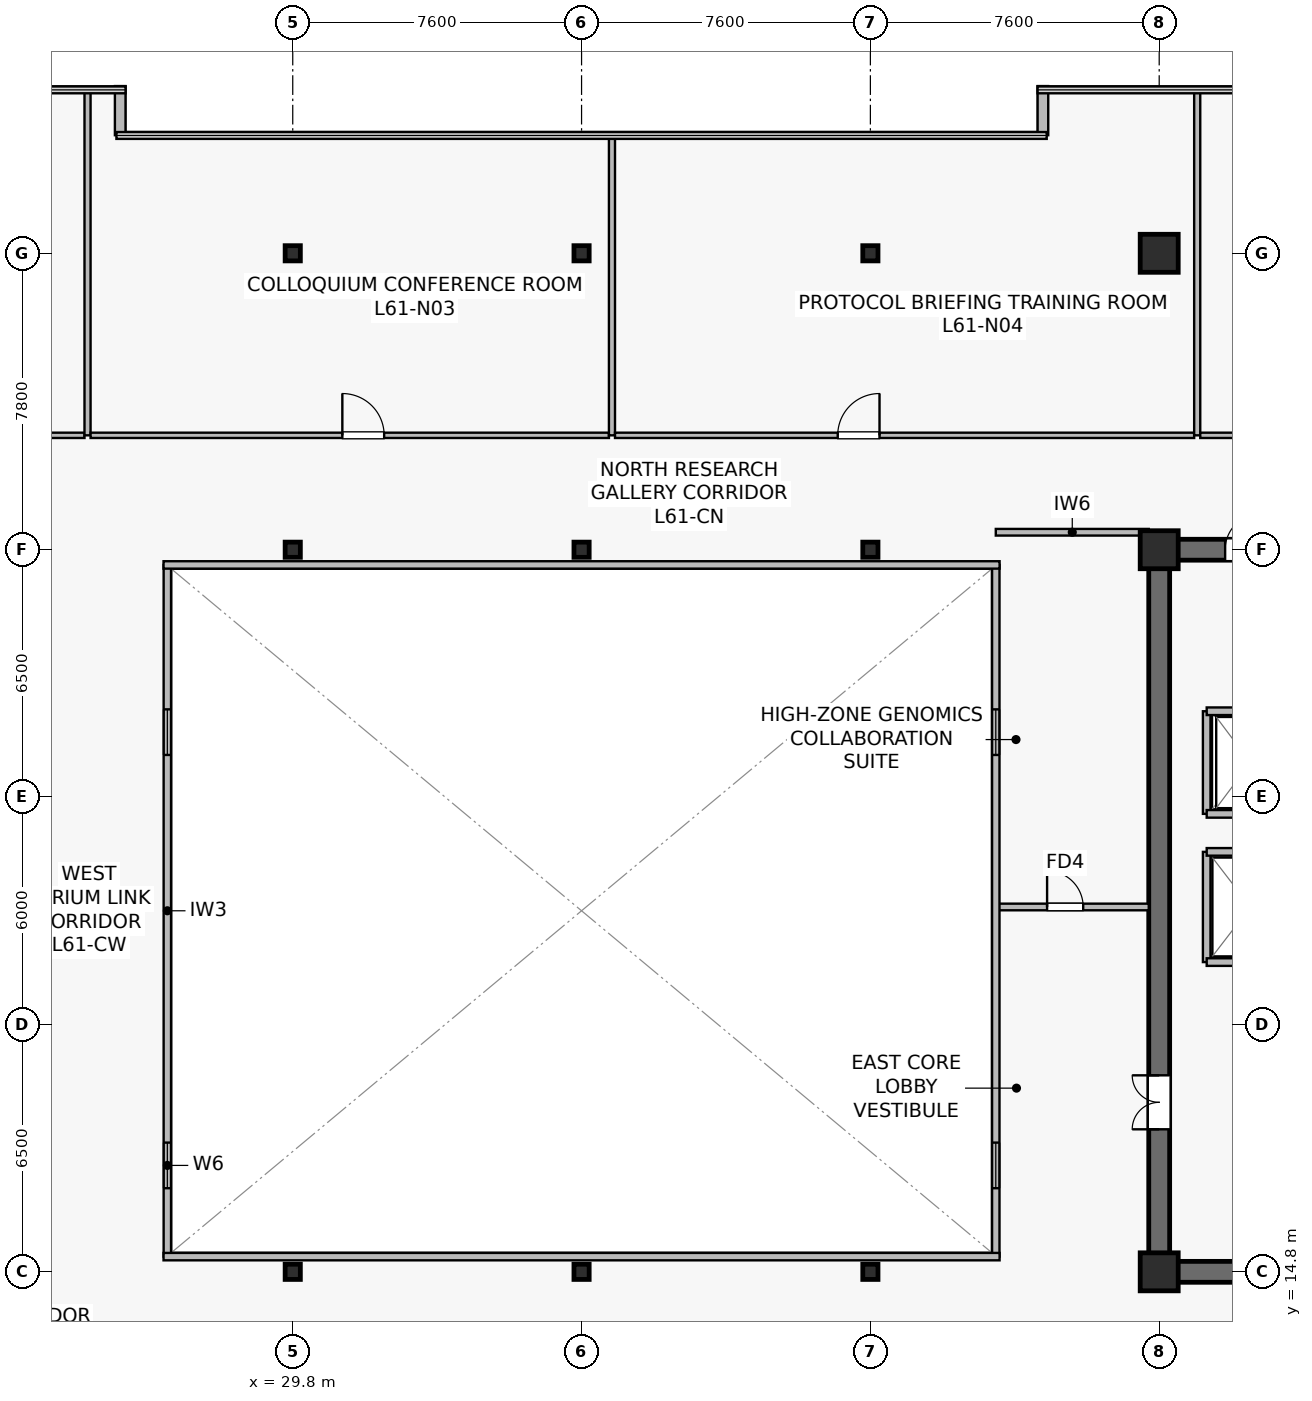
"""IFC4 building model, lengths in metres.
Left out: names, types, materials, properties, quantities, classifications, styles, units other than length and angle.
Written with IfcOpenShell. Run it as: python <this file> out.ifc"""

import sys

from ifc_helpers import new_model, si_unit, direction, frame, frame_2d, origin, origin_2d, place, context, subcontext, project, spatial, rectangle, hollow_rectangle, extrude, source, transform, mapped, element, fill, save


model = new_model("IFC4")
c1 = context("Model", 3, precision=1e-05, world=origin(), true_north=direction((0.0, 1.0)))
c2 = subcontext(c1, "Body", "Model", "MODEL_VIEW")
j1 = project(units=[si_unit("LENGTHUNIT", "METRE"), si_unit("PLANEANGLEUNIT", "RADIAN")], contexts=[c1])
p1 = place(None, origin())
s1 = spatial("IfcSite", under=j1, at=p1, CompositionType="ELEMENT")
p2 = place(p1, origin())
s2 = spatial("IfcBuilding", under=s1, at=p2, CompositionType="ELEMENT")
p3 = place(p2, frame((0.0, 0.0, 254.7)))
s3 = spatial("IfcBuildingStorey", under=s2, at=p3, CompositionType="ELEMENT", Elevation=254.7)
p4 = place(p3, frame((52.325, 14.8, 0.0), z_axis=(0.0, 0.0, 1.0), x_axis=(1.0, 0.0, 0.0)))
e1 = element("IfcWall", 1, at=p4, inside=s3, PredefinedType="SHEAR", context=c2, shape_type="SweptSolid", body=[
    extrude(rectangle(XDim=15.35, YDim=0.55, at=frame_2d((7.675, 0.0))), origin(), (0.0, 0.0, 1.0), 3.8),
])
p5 = place(p3, frame((52.325, 33.8, 0.0), z_axis=(0.0, 0.0, 1.0), x_axis=(1.0, 0.0, 0.0)))
e2 = element("IfcWall", 2, at=p5, inside=s3, PredefinedType="SHEAR", context=c2, shape_type="SweptSolid", body=[
    extrude(rectangle(XDim=15.35, YDim=0.55, at=frame_2d((7.675, 0.0))), origin(), (0.0, 0.0, 1.0), 3.8),
])
p6 = place(p5, frame((8.775, 0.0, 0.0)))
e3 = element("IfcOpeningElement", 3, at=p6, cuts=e2, PredefinedType="OPENING", context=c2, shape_type="SweptSolid", body=[
    extrude(rectangle(XDim=0.95, YDim=2.15, at=frame_2d((0.475, 1.075))), frame((0.0, 0.285, 0.0), z_axis=(0.0, -1.0, 0.0), x_axis=(1.0, 0.0, 0.0)), (0.0, 0.0, 1.0), 0.57),
])
p7 = place(p5, frame((5.41, 0.0, 0.0)))
e4 = element("IfcOpeningElement", 4, at=p7, cuts=e2, PredefinedType="OPENING", context=c2, shape_type="SweptSolid", body=[
    extrude(rectangle(XDim=0.95, YDim=2.15, at=frame_2d((0.475, 1.075))), frame((0.0, 0.285, 0.0), z_axis=(0.0, -1.0, 0.0), x_axis=(1.0, 0.0, 0.0)), (0.0, 0.0, 1.0), 0.57),
])
p8 = place(p5, frame((2.01, 0.0, 0.0)))
e5 = element("IfcOpeningElement", 5, at=p8, cuts=e2, PredefinedType="OPENING", context=c2, shape_type="SweptSolid", body=[
    extrude(rectangle(XDim=0.95, YDim=2.15, at=frame_2d((0.475, 1.075))), frame((0.0, 0.285, 0.0), z_axis=(0.0, -1.0, 0.0), x_axis=(1.0, 0.0, 0.0)), (0.0, 0.0, 1.0), 0.57),
])
p9 = place(p3, frame((52.6, 15.075, 0.0), z_axis=(0.0, 0.0, 1.0), x_axis=(0.0, 1.0, 0.0)))
e6 = element("IfcWall", 6, at=p9, inside=s3, PredefinedType="SHEAR", context=c2, shape_type="SweptSolid", body=[
    extrude(rectangle(XDim=18.45, YDim=0.55, at=frame_2d((9.225, 0.0))), origin(), (0.0, 0.0, 1.0), 3.8),
])
p10 = place(p9, frame((3.475, 0.0, 0.0)))
e7 = element("IfcOpeningElement", 7, at=p10, cuts=e6, PredefinedType="OPENING", context=c2, shape_type="SweptSolid", body=[
    extrude(rectangle(XDim=1.42, YDim=2.2, at=frame_2d((0.71, 1.1))), frame((0.0, 0.285, 0.0), z_axis=(0.0, -1.0, 0.0), x_axis=(1.0, 0.0, 0.0)), (0.0, 0.0, 1.0), 0.57),
])
m1 = source(origin(), c2, "Body", "SweptSolid", [
    extrude(rectangle(XDim=1.0, YDim=1.0, at=origin_2d()), origin(), (0.0, 0.0, 1.0), 4.1),
])
for number, where, z_axis, x_axis in (
    (8, (52.6, 14.8, 0.0), (0.0, 0.0, 1.0), (1.0, 0.0, 0.0)),
    (9, (52.6, 33.8, 0.0), (0.0, 0.0, 1.0), (1.0, 0.0, 0.0)),
    (10, (52.6, 41.6, 0.0), (0.0, 0.0, 1.0), (1.0, 0.0, 0.0)),
):
    element("IfcColumn", number, at=place(p3, frame(where, z_axis=z_axis, x_axis=x_axis)), inside=s3, PredefinedType="COLUMN", context=c2, shape_type="MappedRepresentation", body=[
        mapped(m1, transform((0.0, 0.0, 0.0), scale=1.0)),
    ])
m2 = source(origin(), c2, "Body", "SweptSolid", [
    extrude(hollow_rectangle(XDim=0.4, YDim=0.4, WallThickness=0.019, at=origin_2d()), origin(), (0.0, 0.0, 1.0), 4.1),
])
for number, where, z_axis, x_axis in (
    (11, (29.8, 14.8, 0.0), (0.0, 0.0, 1.0), (1.0, 0.0, 0.0)),
    (12, (29.8, 33.8, 0.0), (0.0, 0.0, 1.0), (1.0, 0.0, 0.0)),
    (13, (29.8, 41.6, 0.0), (0.0, 0.0, 1.0), (1.0, 0.0, 0.0)),
    (14, (37.4, 14.8, 0.0), (0.0, 0.0, 1.0), (1.0, 0.0, 0.0)),
    (15, (37.4, 33.8, 0.0), (0.0, 0.0, 1.0), (1.0, 0.0, 0.0)),
    (16, (37.4, 41.6, 0.0), (0.0, 0.0, 1.0), (1.0, 0.0, 0.0)),
    (17, (45.0, 14.8, 0.0), (0.0, 0.0, 1.0), (1.0, 0.0, 0.0)),
    (18, (45.0, 33.8, 0.0), (0.0, 0.0, 1.0), (1.0, 0.0, 0.0)),
    (19, (45.0, 41.6, 0.0), (0.0, 0.0, 1.0), (1.0, 0.0, 0.0)),
):
    element("IfcColumn", number, at=place(p3, frame(where, z_axis=z_axis, x_axis=x_axis)), inside=s3, PredefinedType="COLUMN", context=c2, shape_type="MappedRepresentation", body=[
        mapped(m2, transform((0.0, 0.0, 0.0), scale=1.0)),
    ])
for number, where, z_axis, x_axis in (
    (20, (49.54, 46.0, 0.0), (0.0, 0.0, 1.0), (0.0, -1.0, 0.0)),
    (21, (25.26, 44.707, 0.0), (0.0, 0.0, 1.0), (0.0, 1.0, 0.0)),
):
    element("IfcWall", number, at=place(p3, frame(where, z_axis=z_axis, x_axis=x_axis)), inside=s3, PredefinedType="STANDARD", context=c2, shape_type="SweptSolid", body=[
        extrude(rectangle(XDim=1.293, YDim=0.28, at=frame_2d((0.646, 0.0))), origin(), (0.0, 0.0, 1.0), 3.8),
    ])
p11 = place(p3, frame((53.85, 26.85, 0.0), z_axis=(0.0, 0.0, 1.0), x_axis=(0.0, 1.0, 0.0)))
e22 = element("IfcWall", 22, at=p11, inside=s3, PredefinedType="SOLIDWALL", context=c2, shape_type="SweptSolid", body=[
    extrude(rectangle(XDim=2.7, YDim=0.2, at=frame_2d((1.35, 0.0))), origin(), (0.0, 0.0, 1.0), 3.8),
])
p12 = place(p3, frame((53.85, 29.55, 0.0), z_axis=(0.0, 0.0, 1.0), x_axis=(1.0, 0.0, 0.0)))
e23 = element("IfcWall", 23, at=p12, inside=s3, PredefinedType="SOLIDWALL", context=c2, shape_type="SweptSolid", body=[
    extrude(rectangle(XDim=2.19, YDim=0.2, at=frame_2d((1.095, 0.0))), origin(), (0.0, 0.0, 1.0), 3.8),
])
p13 = place(p3, frame((53.85, 26.85, 0.0), z_axis=(0.0, 0.0, 1.0), x_axis=(1.0, 0.0, 0.0)))
e24 = element("IfcWall", 24, at=p13, inside=s3, PredefinedType="SOLIDWALL", context=c2, shape_type="SweptSolid", body=[
    extrude(rectangle(XDim=2.19, YDim=0.2, at=frame_2d((1.095, 0.0))), origin(), (0.0, 0.0, 1.0), 3.197),
])
p14 = place(p3, frame((53.85, 22.95, 0.0), z_axis=(0.0, 0.0, 1.0), x_axis=(0.0, 1.0, 0.0)))
e25 = element("IfcWall", 25, at=p14, inside=s3, PredefinedType="SOLIDWALL", context=c2, shape_type="SweptSolid", body=[
    extrude(rectangle(XDim=2.9, YDim=0.2, at=frame_2d((1.45, 0.0))), origin(), (0.0, 0.0, 1.0), 2.935),
])
for number, where, z_axis, x_axis in (
    (26, (53.85, 25.85, 0.0), (0.0, 0.0, 1.0), (1.0, 0.0, 0.0)),
    (27, (53.85, 22.95, 0.0), (0.0, 0.0, 1.0), (1.0, 0.0, 0.0)),
):
    element("IfcWall", number, at=place(p3, frame(where, z_axis=z_axis, x_axis=x_axis)), inside=s3, PredefinedType="SOLIDWALL", context=c2, shape_type="SweptSolid", body=[
        extrude(rectangle(XDim=2.19, YDim=0.2, at=frame_2d((1.095, 0.0))), origin(), (0.0, 0.0, 1.0), 3.8),
    ])
p15 = place(p3, frame((48.3, 34.26, 0.0), z_axis=(0.0, 0.0, 1.0), x_axis=(1.0, 0.0, 0.0)))
e28 = element("IfcWall", 28, at=p15, inside=s3, PredefinedType="PARTITIONING", context=c2, shape_type="SweptSolid", body=[
    extrude(rectangle(XDim=4.025, YDim=0.175, at=frame_2d((2.012, 0.0))), origin(), (0.0, 0.0, 1.0), 3.535),
])
p16 = place(p3, frame((48.3, 24.4, 0.0), z_axis=(0.0, 0.0, 1.0), x_axis=(1.0, 0.0, 0.0)))
e29 = element("IfcWall", 29, at=p16, inside=s3, PredefinedType="PARTITIONING", context=c2, shape_type="SweptSolid", body=[
    extrude(rectangle(XDim=4.025, YDim=0.175, at=frame_2d((2.012, 0.0))), origin(), (0.0, 0.0, 1.0), 3.8),
])
p17 = place(p16, frame((1.35, 0.0, 0.0)))
e30 = element("IfcOpeningElement", 30, at=p17, cuts=e29, PredefinedType="OPENING", context=c2, shape_type="SweptSolid", body=[
    extrude(rectangle(XDim=0.95, YDim=2.15, at=frame_2d((0.475, 1.075))), frame((0.0, 0.098, 0.0), z_axis=(0.0, -1.0, 0.0), x_axis=(1.0, 0.0, 0.0)), (0.0, 0.0, 1.0), 0.195),
])
p18 = place(p3, frame((26.5, 15.2, 0.0), z_axis=(0.0, 0.0, 1.0), x_axis=(0.0, 1.0, 0.0)))
e31 = element("IfcWall", 31, at=p18, inside=s3, PredefinedType="SOLIDWALL", context=c2, shape_type="SweptSolid", body=[
    extrude(rectangle(XDim=18.2, YDim=0.195, at=frame_2d((9.1, 0.0))), origin(), (0.0, 0.0, 1.0), 3.8),
])
p19 = place(p18, frame((1.8, 0.0, 0.9)))
e32 = element("IfcOpeningElement", 32, at=p19, cuts=e31, PredefinedType="OPENING", context=c2, shape_type="SweptSolid", body=[
    extrude(rectangle(XDim=1.2, YDim=1.35, at=frame_2d((0.6, 0.675))), frame((0.0, 0.107, 0.0), z_axis=(0.0, -1.0, 0.0), x_axis=(1.0, 0.0, 0.0)), (0.0, 0.0, 1.0), 0.215),
])
p20 = place(p18, frame((13.2, 0.0, 0.9)))
e33 = element("IfcOpeningElement", 33, at=p20, cuts=e31, PredefinedType="OPENING", context=c2, shape_type="SweptSolid", body=[
    extrude(rectangle(XDim=1.2, YDim=1.35, at=frame_2d((0.6, 0.675))), frame((0.0, 0.107, 0.0), z_axis=(0.0, -1.0, 0.0), x_axis=(1.0, 0.0, 0.0)), (0.0, 0.0, 1.0), 0.215),
])
p21 = place(p3, frame((48.3, 15.2, 0.0), z_axis=(0.0, 0.0, 1.0), x_axis=(0.0, 1.0, 0.0)))
e34 = element("IfcWall", 34, at=p21, inside=s3, PredefinedType="SOLIDWALL", context=c2, shape_type="SweptSolid", body=[
    extrude(rectangle(XDim=18.2, YDim=0.195, at=frame_2d((9.1, 0.0))), origin(), (0.0, 0.0, 1.0), 3.8),
])
p22 = place(p21, frame((1.8, 0.0, 0.9)))
e35 = element("IfcOpeningElement", 35, at=p22, cuts=e34, PredefinedType="OPENING", context=c2, shape_type="SweptSolid", body=[
    extrude(rectangle(XDim=1.2, YDim=1.35, at=frame_2d((0.6, 0.675))), frame((0.0, 0.107, 0.0), z_axis=(0.0, -1.0, 0.0), x_axis=(1.0, 0.0, 0.0)), (0.0, 0.0, 1.0), 0.215),
])
p23 = place(p21, frame((13.2, 0.0, 0.9)))
e36 = element("IfcOpeningElement", 36, at=p23, cuts=e34, PredefinedType="OPENING", context=c2, shape_type="SweptSolid", body=[
    extrude(rectangle(XDim=1.2, YDim=1.35, at=frame_2d((0.6, 0.675))), frame((0.0, 0.107, 0.0), z_axis=(0.0, -1.0, 0.0), x_axis=(1.0, 0.0, 0.0)), (0.0, 0.0, 1.0), 0.215),
])
for number, where, z_axis, x_axis in (
    (37, (26.4, 15.2, 0.0), (0.0, 0.0, 1.0), (1.0, 0.0, 0.0)),
    (38, (26.4, 33.4, 0.0), (0.0, 0.0, 1.0), (1.0, 0.0, 0.0)),
):
    element("IfcWall", number, at=place(p3, frame(where, z_axis=z_axis, x_axis=x_axis)), inside=s3, PredefinedType="SOLIDWALL", context=c2, shape_type="SweptSolid", body=[
        extrude(rectangle(XDim=22.0, YDim=0.195, at=frame_2d((11.0, 0.0))), origin(), (0.0, 0.0, 1.0), 3.8),
    ])
p24 = place(p3, frame((13.28, 36.81, 0.0), z_axis=(0.0, 0.0, 1.0), x_axis=(1.0, 0.0, 0.0)))
e39 = element("IfcWall", 39, at=p24, inside=s3, PredefinedType="PARTITIONING", context=c2, shape_type="SweptSolid", body=[
    extrude(rectangle(XDim=11.04, YDim=0.14, at=frame_2d((5.52, 0.0))), origin(), (0.0, 0.0, 1.0), 3.197),
])
p25 = place(p24, frame((4.138, 0.0, 0.0)))
e40 = element("IfcOpeningElement", 40, at=p25, cuts=e39, PredefinedType="OPENING", context=c2, shape_type="SweptSolid", body=[
    extrude(rectangle(XDim=1.1, YDim=2.18, at=frame_2d((0.55, 1.09))), frame((0.0, 0.08, 0.0), z_axis=(0.0, -1.0, 0.0), x_axis=(1.0, 0.0, 0.0)), (0.0, 0.0, 1.0), 0.16),
])
p26 = place(p3, frame((24.4, 36.81, 0.0), z_axis=(0.0, 0.0, 1.0), x_axis=(0.0, 1.0, 0.0)))
e41 = element("IfcWall", 41, at=p26, inside=s3, PredefinedType="PARTITIONING", context=c2, shape_type="SweptSolid", body=[
    extrude(rectangle(XDim=9.08, YDim=0.16, at=frame_2d((4.54, 0.0))), origin(), (0.0, 0.0, 1.0), 3.135),
])
p27 = place(p3, frame((24.48, 36.81, 0.0), z_axis=(0.0, 0.0, 1.0), x_axis=(1.0, 0.0, 0.0)))
e42 = element("IfcWall", 42, at=p27, inside=s3, PredefinedType="PARTITIONING", context=c2, shape_type="SweptSolid", body=[
    extrude(rectangle(XDim=13.64, YDim=0.14, at=frame_2d((6.82, 0.0))), origin(), (0.0, 0.0, 1.0), 3.197),
])
p28 = place(p27, frame((6.625, 0.0, 0.0)))
e43 = element("IfcOpeningElement", 43, at=p28, cuts=e42, PredefinedType="OPENING", context=c2, shape_type="SweptSolid", body=[
    extrude(rectangle(XDim=1.1, YDim=2.18, at=frame_2d((0.55, 1.09))), frame((0.0, 0.08, 0.0), z_axis=(0.0, -1.0, 0.0), x_axis=(1.0, 0.0, 0.0)), (0.0, 0.0, 1.0), 0.16),
])
p29 = place(p3, frame((38.2, 36.81, 0.0), z_axis=(0.0, 0.0, 1.0), x_axis=(0.0, 1.0, 0.0)))
e44 = element("IfcWall", 44, at=p29, inside=s3, PredefinedType="PARTITIONING", context=c2, shape_type="SweptSolid", body=[
    extrude(rectangle(XDim=7.88, YDim=0.16, at=frame_2d((3.94, 0.0))), origin(), (0.0, 0.0, 1.0), 3.135),
])
p30 = place(p3, frame((38.28, 36.81, 0.0), z_axis=(0.0, 0.0, 1.0), x_axis=(1.0, 0.0, 0.0)))
e45 = element("IfcWall", 45, at=p30, inside=s3, PredefinedType="PARTITIONING", context=c2, shape_type="SweptSolid", body=[
    extrude(rectangle(XDim=15.24, YDim=0.14, at=frame_2d((7.62, 0.0))), origin(), (0.0, 0.0, 1.0), 3.197),
])
p31 = place(p30, frame((5.86, 0.0, 0.0)))
e46 = element("IfcOpeningElement", 46, at=p31, cuts=e45, PredefinedType="OPENING", context=c2, shape_type="SweptSolid", body=[
    extrude(rectangle(XDim=1.1, YDim=2.18, at=frame_2d((0.55, 1.09))), frame((0.0, 0.08, 0.0), z_axis=(0.0, -1.0, 0.0), x_axis=(1.0, 0.0, 0.0)), (0.0, 0.0, 1.0), 0.16),
])
p32 = place(p3, frame((53.6, 36.81, 0.0), z_axis=(0.0, 0.0, 1.0), x_axis=(0.0, 1.0, 0.0)))
e47 = element("IfcWall", 47, at=p32, inside=s3, PredefinedType="PARTITIONING", context=c2, shape_type="SweptSolid", body=[
    extrude(rectangle(XDim=9.08, YDim=0.16, at=frame_2d((4.54, 0.0))), origin(), (0.0, 0.0, 1.0), 3.135),
])
p33 = place(p3, frame((53.68, 36.81, 0.0), z_axis=(0.0, 0.0, 1.0), x_axis=(1.0, 0.0, 0.0)))
e48 = element("IfcWall", 48, at=p33, inside=s3, PredefinedType="PARTITIONING", context=c2, shape_type="SweptSolid", body=[
    extrude(rectangle(XDim=13.81, YDim=0.14, at=frame_2d((6.905, 0.0))), origin(), (0.0, 0.0, 1.0), 3.197),
])
p34 = place(p33, frame((6.715, 0.0, 0.0)))
e49 = element("IfcOpeningElement", 49, at=p34, cuts=e48, PredefinedType="OPENING", context=c2, shape_type="SweptSolid", body=[
    extrude(rectangle(XDim=1.1, YDim=2.18, at=frame_2d((0.55, 1.09))), frame((0.0, 0.08, 0.0), z_axis=(0.0, -1.0, 0.0), x_axis=(1.0, 0.0, 0.0)), (0.0, 0.0, 1.0), 0.16),
])
m3 = source(origin(), c2, "Body", "SweptSolid", [
    extrude(rectangle(XDim=1.2, YDim=1.35, at=frame_2d((0.6, 0.675))), frame((0.0, 0.03, 0.0), z_axis=(0.0, -1.0, 0.0), x_axis=(1.0, 0.0, 0.0)), (0.0, 0.0, 1.0), 0.06),
])
p35 = place(p19, origin())
e50 = element("IfcWindow", 50, at=p35, inside=s3, PartitioningType="SINGLE_PANEL", PredefinedType="WINDOW", context=c2, shape_type="MappedRepresentation", body=[
    mapped(m3, transform((0.0, 0.0, 0.0), scale=1.0)),
])
fill(e32, e50)
p36 = place(p20, origin())
e51 = element("IfcWindow", 51, at=p36, inside=s3, PartitioningType="SINGLE_PANEL", PredefinedType="WINDOW", context=c2, shape_type="MappedRepresentation", body=[
    mapped(m3, transform((0.0, 0.0, 0.0), scale=1.0)),
])
fill(e33, e51)
p37 = place(p22, origin())
e52 = element("IfcWindow", 52, at=p37, inside=s3, PartitioningType="SINGLE_PANEL", PredefinedType="WINDOW", context=c2, shape_type="MappedRepresentation", body=[
    mapped(m3, transform((0.0, 0.0, 0.0), scale=1.0)),
])
fill(e35, e52)
p38 = place(p23, origin())
e53 = element("IfcWindow", 53, at=p38, inside=s3, PartitioningType="SINGLE_PANEL", PredefinedType="WINDOW", context=c2, shape_type="MappedRepresentation", body=[
    mapped(m3, transform((0.0, 0.0, 0.0), scale=1.0)),
])
fill(e36, e53)
m4 = source(origin(), c2, "Body", "SweptSolid", [
    extrude(rectangle(XDim=1.42, YDim=2.2, at=frame_2d((0.71, 1.1))), frame((0.0, 0.025, 0.0), z_axis=(0.0, -1.0, 0.0), x_axis=(1.0, 0.0, 0.0)), (0.0, 0.0, 1.0), 0.05),
])
p39 = place(p10, origin())
e54 = element("IfcDoor", 54, at=p39, inside=s3, OperationType="DOUBLE_DOOR_SINGLE_SWING", PredefinedType="DOOR", context=c2, shape_type="MappedRepresentation", body=[
    mapped(m4, transform((0.0, 0.0, 0.0), scale=1.0)),
])
fill(e7, e54)
m5 = source(origin(), c2, "Body", "SweptSolid", [
    extrude(rectangle(XDim=0.95, YDim=2.15, at=frame_2d((0.475, 1.075))), frame((0.0, 0.025, 0.0), z_axis=(0.0, -1.0, 0.0), x_axis=(1.0, 0.0, 0.0)), (0.0, 0.0, 1.0), 0.05),
])
p40 = place(p8, origin())
e55 = element("IfcDoor", 55, at=p40, inside=s3, OperationType="SINGLE_SWING_RIGHT", PredefinedType="DOOR", context=c2, shape_type="MappedRepresentation", body=[
    mapped(m5, transform((0.0, 0.0, 0.0), scale=1.0)),
])
fill(e5, e55)
p41 = place(p17, origin())
e56 = element("IfcDoor", 56, at=p41, inside=s3, OperationType="SINGLE_SWING_LEFT", PredefinedType="DOOR", context=c2, shape_type="MappedRepresentation", body=[
    mapped(m5, transform((0.0, 0.0, 0.0), scale=1.0)),
])
fill(e30, e56)
m6 = source(origin(), c2, "Body", "SweptSolid", [
    extrude(rectangle(XDim=1.1, YDim=2.18, at=frame_2d((0.55, 1.09))), frame((0.0, 0.025, 0.0), z_axis=(0.0, -1.0, 0.0), x_axis=(1.0, 0.0, 0.0)), (0.0, 0.0, 1.0), 0.05),
])
p42 = place(p28, origin())
e57 = element("IfcDoor", 57, at=p42, inside=s3, OperationType="SINGLE_SWING_LEFT", PredefinedType="DOOR", context=c2, shape_type="MappedRepresentation", body=[
    mapped(m6, transform((0.0, 0.0, 0.0), scale=1.0)),
])
fill(e43, e57)
p43 = place(p31, origin())
e58 = element("IfcDoor", 58, at=p43, inside=s3, OperationType="SINGLE_SWING_RIGHT", PredefinedType="DOOR", context=c2, shape_type="MappedRepresentation", body=[
    mapped(m6, transform((0.0, 0.0, 0.0), scale=1.0)),
])
fill(e46, e58)
save(model, sys.argv[1])
